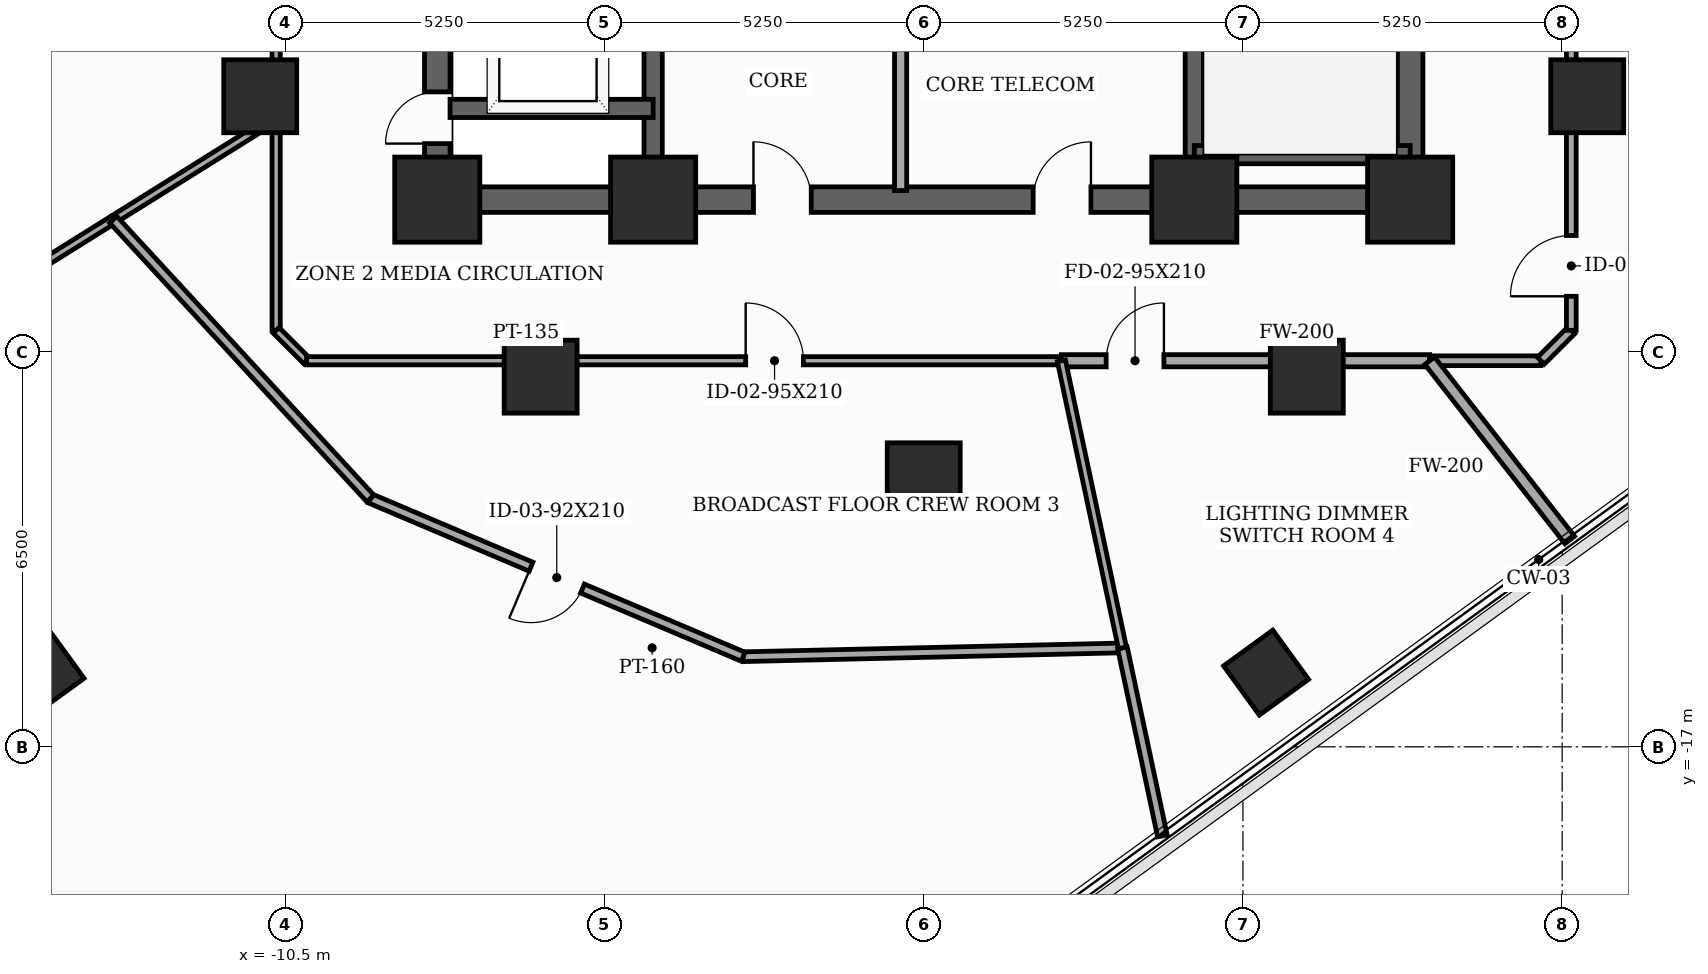
"""IFC4 building model, lengths in metres.
Left out: names, types, materials, properties, quantities, classifications, styles, units other than length and angle.
Written with IfcOpenShell. Run it as: python <this file> out.ifc"""

import sys

from ifc_helpers import new_model, si_unit, direction, frame, frame_2d, origin, origin_2d, place, context, subcontext, project, spatial, rectangle, extrude, element, fill, save


model = new_model("IFC4")
c1 = context("Model", 3, precision=1e-05, world=origin(), true_north=direction((0.0, 1.0)))
c2 = subcontext(c1, "Body", "Model", "MODEL_VIEW")
j1 = project(units=[si_unit("LENGTHUNIT", "METRE"), si_unit("PLANEANGLEUNIT", "RADIAN")], contexts=[c1])
p1 = place(None, origin())
s1 = spatial("IfcSite", under=j1, at=p1, CompositionType="ELEMENT")
p2 = place(p1, origin())
s2 = spatial("IfcBuilding", under=s1, at=p2, CompositionType="ELEMENT")
p3 = place(p2, frame((0.0, 0.0, 162.0)))
s3 = spatial("IfcBuildingStorey", under=s2, at=p3, CompositionType="ELEMENT", Elevation=162.0)
for number, where, z_axis, x_axis in (
    (1, (-8.0, -8.0, 0.0), (0.0, 0.0, 1.0), (1.0, 0.0, 0.0)),
    (2, (-4.45, -8.0, 0.0), (0.0, 0.0, 1.0), (1.0, 0.0, 0.0)),
    (3, (4.45, -8.0, 0.0), (0.0, 0.0, 1.0), (1.0, 0.0, 0.0)),
    (4, (8.0, -8.0, 0.0), (0.0, 0.0, 1.0), (1.0, 0.0, 0.0)),
):
    element("IfcColumn", number, at=place(p3, frame(where, z_axis=z_axis, x_axis=x_axis)), inside=s3, PredefinedType="COLUMN", context=c2, shape_type="SweptSolid", body=[
        extrude(rectangle(XDim=1.4, YDim=1.4, at=origin_2d()), origin(), (0.0, 0.0, 1.0), 3.7),
    ])
for number, where, z_axis, x_axis in (
    (5, (-10.912, -6.3, 0.0), (0.0, 0.0, 1.0), (1.0, 0.0, 0.0)),
    (6, (-6.3, -10.912, 0.0), (0.0, 0.0, 1.0), (1.0, 0.0, 0.0)),
    (7, (0.0, -12.6, 0.0), (0.0, 0.0, 1.0), (1.0, 0.0, 0.0)),
    (8, (6.3, -10.912, 0.0), (0.0, 0.0, 1.0), (1.0, 0.0, 0.0)),
    (9, (10.912, -6.3, 0.0), (0.0, 0.0, 1.0), (1.0, 0.0, 0.0)),
):
    element("IfcColumn", number, at=place(p3, frame(where, z_axis=z_axis, x_axis=x_axis)), inside=s3, PredefinedType="COLUMN", context=c2, shape_type="SweptSolid", body=[
        extrude(rectangle(XDim=1.2, YDim=1.2, at=origin_2d()), origin(), (0.0, 0.0, 1.0), 3.7),
    ])
for number, where, z_axis, x_axis in (
    (10, (5.63, -15.78, 0.0), (0.0, 0.0, 1.0), (0.809, 0.588, 0.0)),
    (11, (-14.507, -15.763, 0.0), (0.0, 0.0, 1.0), (0.809, 0.588, 0.0)),
):
    element("IfcColumn", number, at=place(p3, frame(where, z_axis=z_axis, x_axis=x_axis)), inside=s3, PredefinedType="COLUMN", context=c2, shape_type="SweptSolid", body=[
        extrude(rectangle(XDim=1.0, YDim=1.0, at=origin_2d()), origin(), (0.0, 0.0, 1.0), 3.7),
    ])
p4 = place(p3, frame((-8.0, -8.0, 0.0), z_axis=(0.0, 0.0, 1.0), x_axis=(0.0, 1.0, 0.0)))
e12 = element("IfcWall", 12, at=p4, inside=s3, PredefinedType="SHEAR", context=c2, shape_type="SweptSolid", body=[
    extrude(rectangle(XDim=16.0, YDim=0.42, at=frame_2d((8.0, 0.0))), origin(), (0.0, 0.0, 1.0), 3.5),
])
p5 = place(p4, frame((0.922, 0.0, 0.0)))
e13 = element("IfcOpeningElement", 13, at=p5, cuts=e12, PredefinedType="OPENING", context=c2, shape_type="SweptSolid", body=[
    extrude(rectangle(XDim=0.85, YDim=2.02, at=frame_2d((0.425, 1.01))), frame((0.0, 0.22, 0.0), z_axis=(0.0, -1.0, 0.0), x_axis=(1.0, 0.0, 0.0)), (0.0, 0.0, 1.0), 0.44),
])
p6 = place(p4, frame((5.35, 0.0, 0.0)))
e14 = element("IfcOpeningElement", 14, at=p6, cuts=e12, PredefinedType="OPENING", context=c2, shape_type="SweptSolid", body=[
    extrude(rectangle(XDim=1.05, YDim=2.15, at=frame_2d((0.525, 1.075))), frame((0.0, 0.22, 0.0), z_axis=(0.0, -1.0, 0.0), x_axis=(1.0, 0.0, 0.0)), (0.0, 0.0, 1.0), 0.44),
])
p7 = place(p3, frame((8.0, -8.0, 0.0), z_axis=(0.0, 0.0, 1.0), x_axis=(0.0, 1.0, 0.0)))
e15 = element("IfcWall", 15, at=p7, inside=s3, PredefinedType="SHEAR", context=c2, shape_type="SweptSolid", body=[
    extrude(rectangle(XDim=16.0, YDim=0.42, at=frame_2d((8.0, 0.0))), origin(), (0.0, 0.0, 1.0), 3.5),
])
p8 = place(p7, frame((9.6, 0.0, 0.0)))
e16 = element("IfcOpeningElement", 16, at=p8, cuts=e15, PredefinedType="OPENING", context=c2, shape_type="SweptSolid", body=[
    extrude(rectangle(XDim=1.05, YDim=2.15, at=frame_2d((0.525, 1.075))), frame((0.0, 0.22, 0.0), z_axis=(0.0, -1.0, 0.0), x_axis=(1.0, 0.0, 0.0)), (0.0, 0.0, 1.0), 0.44),
])
p9 = place(p7, frame((14.229, 0.0, 0.0)))
e17 = element("IfcOpeningElement", 17, at=p9, cuts=e15, PredefinedType="OPENING", context=c2, shape_type="SweptSolid", body=[
    extrude(rectangle(XDim=0.85, YDim=2.02, at=frame_2d((0.425, 1.01))), frame((0.0, 0.22, 0.0), z_axis=(0.0, -1.0, 0.0), x_axis=(1.0, 0.0, 0.0)), (0.0, 0.0, 1.0), 0.44),
])
p10 = place(p3, frame((-8.0, -8.0, 0.0), z_axis=(0.0, 0.0, 1.0), x_axis=(1.0, 0.0, 0.0)))
e18 = element("IfcWall", 18, at=p10, inside=s3, PredefinedType="SHEAR", context=c2, shape_type="SweptSolid", body=[
    extrude(rectangle(XDim=16.0, YDim=0.42, at=frame_2d((8.0, 0.0))), origin(), (0.0, 0.0, 1.0), 3.5),
])
p11 = place(p10, frame((5.2, 0.0, 0.0)))
e19 = element("IfcOpeningElement", 19, at=p11, cuts=e18, PredefinedType="OPENING", context=c2, shape_type="SweptSolid", body=[
    extrude(rectangle(XDim=0.95, YDim=2.1, at=frame_2d((0.475, 1.05))), frame((0.0, 0.22, 0.0), z_axis=(0.0, -1.0, 0.0), x_axis=(1.0, 0.0, 0.0)), (0.0, 0.0, 1.0), 0.44),
])
p12 = place(p10, frame((9.8, 0.0, 0.0)))
e20 = element("IfcOpeningElement", 20, at=p12, cuts=e18, PredefinedType="OPENING", context=c2, shape_type="SweptSolid", body=[
    extrude(rectangle(XDim=0.95, YDim=2.1, at=frame_2d((0.475, 1.05))), frame((0.0, 0.22, 0.0), z_axis=(0.0, -1.0, 0.0), x_axis=(1.0, 0.0, 0.0)), (0.0, 0.0, 1.0), 0.44),
])
for number, where, z_axis, x_axis in (
    (21, (-4.45, -7.79, 0.0), (0.0, 0.0, 1.0), (0.0, 1.0, 0.0)),
    (22, (4.45, -7.79, 0.0), (0.0, 0.0, 1.0), (0.0, 1.0, 0.0)),
):
    element("IfcWall", number, at=place(p3, frame(where, z_axis=z_axis, x_axis=x_axis)), inside=s3, PredefinedType="SHEAR", context=c2, shape_type="SweptSolid", body=[
        extrude(rectangle(XDim=15.58, YDim=0.3, at=frame_2d((7.79, 0.0))), origin(), (0.0, 0.0, 1.0), 3.5),
    ])
p13 = place(p3, frame((4.45, -7.26, 0.0), z_axis=(0.0, 0.0, 1.0), x_axis=(1.0, 0.0, 0.0)))
e23 = element("IfcWall", 23, at=p13, inside=s3, PredefinedType="SHEAR", context=c2, shape_type="SweptSolid", body=[
    extrude(rectangle(XDim=3.55, YDim=0.3, at=frame_2d((1.775, 0.0))), origin(), (0.0, 0.0, 1.0), 3.5),
])
p14 = place(p3, frame((-7.79, -6.5, 0.0), z_axis=(0.0, 0.0, 1.0), x_axis=(1.0, 0.0, 0.0)))
e24 = element("IfcWall", 24, at=p14, inside=s3, PredefinedType="SHEAR", context=c2, shape_type="SweptSolid", body=[
    extrude(rectangle(XDim=3.34, YDim=0.3, at=frame_2d((1.67, 0.0))), origin(), (0.0, 0.0, 1.0), 3.5),
])
p15 = place(p3, frame((-0.38, -7.85, 0.0), z_axis=(0.0, 0.0, 1.0), x_axis=(0.0, 1.0, 0.0)))
e25 = element("IfcWall", 25, at=p15, inside=s3, PredefinedType="SOLIDWALL", context=c2, shape_type="SweptSolid", body=[
    extrude(rectangle(XDim=2.95, YDim=0.2, at=frame_2d((1.475, 0.0))), origin(), (0.0, 0.0, 1.0), 2.885),
])
p16 = place(p3, frame((-10.65, 4.742, 0.0), z_axis=(0.0, 0.0, 1.0), x_axis=(0.0, -1.0, 0.0)))
e26 = element("IfcWall", 26, at=p16, inside=s3, PredefinedType="PARTITIONING", context=c2, shape_type="SweptSolid", body=[
    extrude(rectangle(XDim=11.397, YDim=0.135, at=frame_2d((5.698, 0.0))), origin(), (0.0, 0.0, 1.0), 2.885),
])
p17 = place(p16, frame((6.591, 0.0, 0.0)))
e27 = element("IfcOpeningElement", 27, at=p17, cuts=e26, PredefinedType="OPENING", context=c2, shape_type="SweptSolid", body=[
    extrude(rectangle(XDim=0.95, YDim=2.1, at=frame_2d((0.475, 1.05))), frame((0.0, 0.077, 0.0), z_axis=(0.0, -1.0, 0.0), x_axis=(1.0, 0.0, 0.0)), (0.0, 0.0, 1.0), 0.155),
])
p18 = place(p3, frame((-10.65, -6.655, 0.0), z_axis=(0.0, 0.0, 1.0), x_axis=(0.0, -1.0, 0.0)))
e28 = element("IfcWall", 28, at=p18, inside=s3, PredefinedType="PARTITIONING", context=c2, shape_type="SweptSolid", body=[
    extrude(rectangle(XDim=3.495, YDim=0.135, at=frame_2d((1.748, 0.0))), origin(), (0.0, 0.0, 1.0), 2.885),
])
p19 = place(p3, frame((-10.65, -10.15, 0.0), z_axis=(0.0, 0.0, 1.0), x_axis=(0.707106781187, -0.707106781187, 0.0)))
e29 = element("IfcWall", 29, at=p19, inside=s3, PredefinedType="PARTITIONING", context=c2, shape_type="SweptSolid", body=[
    extrude(rectangle(XDim=0.707, YDim=0.135, at=frame_2d((0.354, 0.0))), origin(), (0.0, 0.0, 1.0), 3.5),
])
p20 = place(p3, frame((-10.15, -10.65, 0.0), z_axis=(0.0, 0.0, 1.0), x_axis=(1.0, 0.0, 0.0)))
e30 = element("IfcWall", 30, at=p20, inside=s3, PredefinedType="PARTITIONING", context=c2, shape_type="SweptSolid", body=[
    extrude(rectangle(XDim=12.414, YDim=0.135, at=frame_2d((6.207, 0.0))), origin(), (0.0, 0.0, 1.0), 2.885),
])
p21 = place(p20, frame((7.222, 0.0, 0.0)))
e31 = element("IfcOpeningElement", 31, at=p21, cuts=e30, PredefinedType="OPENING", context=c2, shape_type="SweptSolid", body=[
    extrude(rectangle(XDim=0.95, YDim=2.1, at=frame_2d((0.475, 1.05))), frame((0.0, 0.077, 0.0), z_axis=(0.0, -1.0, 0.0), x_axis=(1.0, 0.0, 0.0)), (0.0, 0.0, 1.0), 0.155),
])
p22 = place(p3, frame((2.264, -10.65, 0.0), z_axis=(0.0, 0.0, 1.0), x_axis=(1.0, 0.0, 0.0)))
e32 = element("IfcWall", 32, at=p22, inside=s3, PredefinedType="SOLIDWALL", context=c2, shape_type="SweptSolid", body=[
    extrude(rectangle(XDim=6.057, YDim=0.2, at=frame_2d((3.029, 0.0))), origin(), (0.0, 0.0, 1.0), 2.885),
])
p23 = place(p22, frame((0.736, 0.0, 0.0)))
e33 = element("IfcOpeningElement", 33, at=p23, cuts=e32, PredefinedType="OPENING", context=c2, shape_type="SweptSolid", body=[
    extrude(rectangle(XDim=0.95, YDim=2.1, at=frame_2d((0.475, 1.05))), frame((0.0, 0.11, 0.0), z_axis=(0.0, -1.0, 0.0), x_axis=(1.0, 0.0, 0.0)), (0.0, 0.0, 1.0), 0.22),
])
p24 = place(p3, frame((8.321, -10.65, 0.0), z_axis=(0.0, 0.0, 1.0), x_axis=(1.0, 0.0, 0.0)))
e34 = element("IfcWall", 34, at=p24, inside=s3, PredefinedType="PARTITIONING", context=c2, shape_type="SweptSolid", body=[
    extrude(rectangle(XDim=1.829, YDim=0.16, at=frame_2d((0.915, 0.0))), origin(), (0.0, 0.0, 1.0), 3.5),
])
p25 = place(p3, frame((10.15, -10.65, 0.0), z_axis=(0.0, 0.0, 1.0), x_axis=(0.707106781187, 0.707106781187, 0.0)))
e35 = element("IfcWall", 35, at=p25, inside=s3, PredefinedType="PARTITIONING", context=c2, shape_type="SweptSolid", body=[
    extrude(rectangle(XDim=0.707, YDim=0.16, at=frame_2d((0.354, 0.0))), origin(), (0.0, 0.0, 1.0), 3.5),
])
p26 = place(p3, frame((10.65, -10.15, 0.0), z_axis=(0.0, 0.0, 1.0), x_axis=(0.0, 1.0, 0.0)))
e36 = element("IfcWall", 36, at=p26, inside=s3, PredefinedType="PARTITIONING", context=c2, shape_type="SweptSolid", body=[
    extrude(rectangle(XDim=5.3, YDim=0.16, at=frame_2d((2.65, 0.0))), origin(), (0.0, 0.0, 1.0), 2.885),
])
p27 = place(p26, frame((0.56, 0.0, 0.0)))
e37 = element("IfcOpeningElement", 37, at=p27, cuts=e36, PredefinedType="OPENING", context=c2, shape_type="SweptSolid", body=[
    extrude(rectangle(XDim=1.0, YDim=2.15, at=frame_2d((0.5, 1.075))), frame((0.0, 0.09, 0.0), z_axis=(0.0, -1.0, 0.0), x_axis=(1.0, 0.0, 0.0)), (0.0, 0.0, 1.0), 0.18),
])
p28 = place(p3, frame((-16.272, -10.167, 0.0), z_axis=(0.0, 0.0, 1.0), x_axis=(0.848097115085, 0.529840809474, 0.0)))
e38 = element("IfcWall", 38, at=p28, inside=s3, PredefinedType="PARTITIONING", context=c2, shape_type="SweptSolid", body=[
    extrude(rectangle(XDim=3.47, YDim=0.135, at=frame_2d((1.735, 0.0))), origin(), (0.0, 0.0, 1.0), 2.985),
])
p29 = place(p3, frame((-13.329, -8.329, 0.0), z_axis=(0.0, 0.0, 1.0), x_axis=(0.848059079617, 0.529901686617, 0.0)))
e39 = element("IfcWall", 39, at=p29, inside=s3, PredefinedType="PARTITIONING", context=c2, shape_type="SweptSolid", body=[
    extrude(rectangle(XDim=3.159, YDim=0.135, at=frame_2d((1.58, 0.0))), origin(), (0.0, 0.0, 1.0), 2.885),
])
p30 = place(p3, frame((3.268, -15.373, 0.0), z_axis=(0.0, 0.0, 1.0), x_axis=(-0.99972988351, -0.023241342836, 0.0)))
e40 = element("IfcWall", 40, at=p30, inside=s3, PredefinedType="PARTITIONING", context=c2, shape_type="SweptSolid", body=[
    extrude(rectangle(XDim=6.24, YDim=0.16, at=frame_2d((3.12, 0.0))), origin(), (0.0, 0.0, 1.0), 2.885),
])
p31 = place(p3, frame((-2.97, -15.518, 0.0), z_axis=(0.0, 0.0, 1.0), x_axis=(-0.920506675175, 0.390726836752, 0.0)))
e41 = element("IfcWall", 41, at=p31, inside=s3, PredefinedType="PARTITIONING", context=c2, shape_type="SweptSolid", body=[
    extrude(rectangle(XDim=6.659, YDim=0.16, at=frame_2d((3.33, 0.0))), origin(), (0.0, 0.0, 1.0), 3.5),
])
p32 = place(p31, frame((2.87, 0.0, 0.0)))
e42 = element("IfcOpeningElement", 42, at=p32, cuts=e41, PredefinedType="OPENING", context=c2, shape_type="SweptSolid", body=[
    extrude(rectangle(XDim=0.92, YDim=2.1, at=frame_2d((0.46, 1.05))), frame((0.0, 0.09, 0.0), z_axis=(0.0, -1.0, 0.0), x_axis=(1.0, 0.0, 0.0)), (0.0, 0.0, 1.0), 0.18),
])
p33 = place(p3, frame((-9.1, -12.916, 0.0), z_axis=(0.0, 0.0, 1.0), x_axis=(-0.677841155448, 0.735208384052, 0.0)))
e43 = element("IfcWall", 43, at=p33, inside=s3, PredefinedType="PARTITIONING", context=c2, shape_type="SweptSolid", body=[
    extrude(rectangle(XDim=6.239, YDim=0.16, at=frame_2d((3.12, 0.0))), origin(), (0.0, 0.0, 1.0), 2.885),
])
p34 = place(p3, frame((3.925, -18.465, 0.0), z_axis=(0.0, 0.0, 1.0), x_axis=(-0.207851365584, 0.978160421314, 0.0)))
e44 = element("IfcWall", 44, at=p34, inside=s3, PredefinedType="PARTITIONING", context=c2, shape_type="SweptSolid", body=[
    extrude(rectangle(XDim=3.161, YDim=0.16, at=frame_2d((1.581, 0.0))), origin(), (0.0, 0.0, 1.0), 2.985),
])
p35 = place(p3, frame((3.268, -15.373, 0.0), z_axis=(0.0, 0.0, 1.0), x_axis=(-0.207954296991, 0.978138543542, 0.0)))
e45 = element("IfcWall", 45, at=p35, inside=s3, PredefinedType="PARTITIONING", context=c2, shape_type="SweptSolid", body=[
    extrude(rectangle(XDim=4.829, YDim=0.135, at=frame_2d((2.414, 0.0))), origin(), (0.0, 0.0, 1.0), 2.885),
])
p36 = place(p3, frame((10.624, -13.598, 0.0), z_axis=(0.0, 0.0, 1.0), x_axis=(-0.615579447743, 0.788074833704, 0.0)))
e46 = element("IfcWall", 46, at=p36, inside=s3, PredefinedType="SOLIDWALL", context=c2, shape_type="SweptSolid", body=[
    extrude(rectangle(XDim=3.741, YDim=0.2, at=frame_2d((1.87, 0.0))), origin(), (0.0, 0.0, 1.0), 2.985),
])
p37 = place(p5, origin())
e47 = element("IfcDoor", 47, at=p37, inside=s3, OperationType="SINGLE_SWING_LEFT", PredefinedType="TRAPDOOR", context=c2, shape_type="SweptSolid", body=[
    extrude(rectangle(XDim=0.85, YDim=2.02, at=frame_2d((0.425, 1.01))), frame((0.0, 0.025, 0.0), z_axis=(0.0, -1.0, 0.0), x_axis=(1.0, 0.0, 0.0)), (0.0, 0.0, 1.0), 0.05),
])
fill(e13, e47)
p38 = place(p11, origin())
e48 = element("IfcDoor", 48, at=p38, inside=s3, OperationType="SINGLE_SWING_LEFT", PredefinedType="DOOR", context=c2, shape_type="SweptSolid", body=[
    extrude(rectangle(XDim=0.95, YDim=2.1, at=frame_2d((0.475, 1.05))), frame((0.0, 0.025, 0.0), z_axis=(0.0, -1.0, 0.0), x_axis=(1.0, 0.0, 0.0)), (0.0, 0.0, 1.0), 0.05),
])
fill(e19, e48)
p39 = place(p12, origin())
e49 = element("IfcDoor", 49, at=p39, inside=s3, OperationType="SINGLE_SWING_RIGHT", PredefinedType="DOOR", context=c2, shape_type="SweptSolid", body=[
    extrude(rectangle(XDim=0.95, YDim=2.1, at=frame_2d((0.475, 1.05))), frame((0.0, 0.025, 0.0), z_axis=(0.0, -1.0, 0.0), x_axis=(1.0, 0.0, 0.0)), (0.0, 0.0, 1.0), 0.05),
])
fill(e20, e49)
p40 = place(p21, origin())
e50 = element("IfcDoor", 50, at=p40, inside=s3, OperationType="SINGLE_SWING_LEFT", PredefinedType="DOOR", context=c2, shape_type="SweptSolid", body=[
    extrude(rectangle(XDim=0.95, YDim=2.1, at=frame_2d((0.475, 1.05))), frame((0.0, 0.025, 0.0), z_axis=(0.0, -1.0, 0.0), x_axis=(1.0, 0.0, 0.0)), (0.0, 0.0, 1.0), 0.05),
])
fill(e31, e50)
p41 = place(p23, origin())
e51 = element("IfcDoor", 51, at=p41, inside=s3, OperationType="SINGLE_SWING_RIGHT", PredefinedType="DOOR", context=c2, shape_type="SweptSolid", body=[
    extrude(rectangle(XDim=0.95, YDim=2.1, at=frame_2d((0.475, 1.05))), frame((0.0, 0.025, 0.0), z_axis=(0.0, -1.0, 0.0), x_axis=(1.0, 0.0, 0.0)), (0.0, 0.0, 1.0), 0.05),
])
fill(e33, e51)
p42 = place(p27, origin())
e52 = element("IfcDoor", 52, at=p42, inside=s3, OperationType="SINGLE_SWING_LEFT", PredefinedType="DOOR", context=c2, shape_type="SweptSolid", body=[
    extrude(rectangle(XDim=1.0, YDim=2.15, at=frame_2d((0.5, 1.075))), frame((0.0, 0.025, 0.0), z_axis=(0.0, -1.0, 0.0), x_axis=(1.0, 0.0, 0.0)), (0.0, 0.0, 1.0), 0.05),
])
fill(e37, e52)
p43 = place(p32, origin())
e53 = element("IfcDoor", 53, at=p43, inside=s3, OperationType="SINGLE_SWING_RIGHT", PredefinedType="DOOR", context=c2, shape_type="SweptSolid", body=[
    extrude(rectangle(XDim=0.92, YDim=2.1, at=frame_2d((0.46, 1.05))), frame((0.0, 0.025, 0.0), z_axis=(0.0, -1.0, 0.0), x_axis=(1.0, 0.0, 0.0)), (0.0, 0.0, 1.0), 0.05),
])
fill(e42, e53)
save(model, sys.argv[1])
